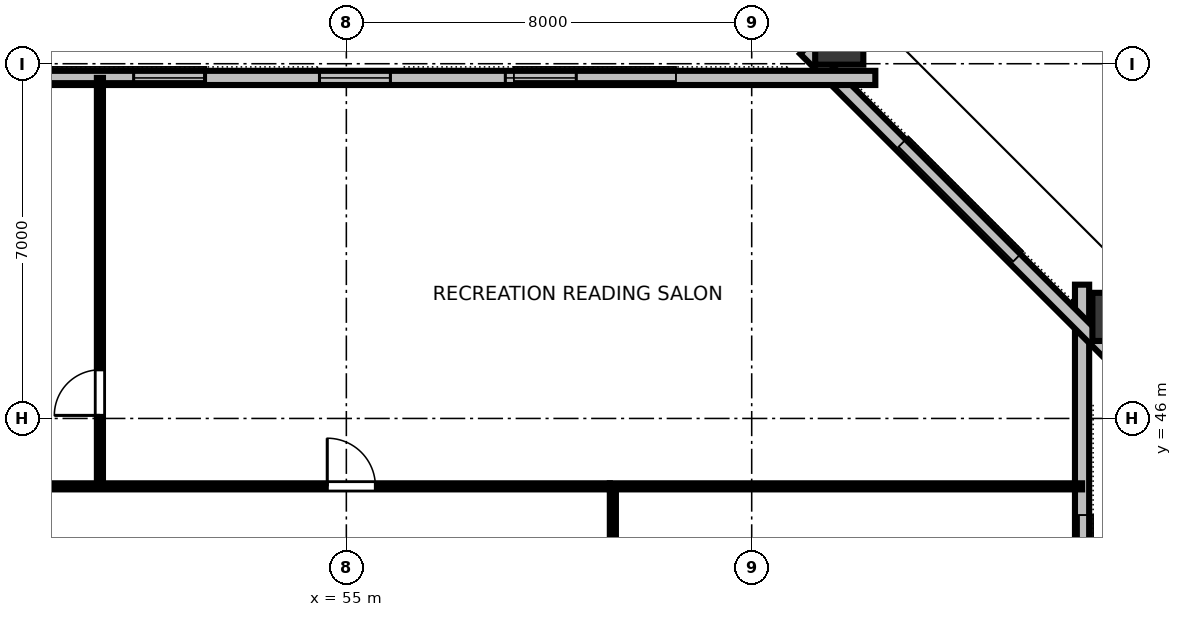
"""IFC4 building model, lengths in metres.
Left out: names, types, materials, properties, quantities, classifications, styles, units other than length and angle.
Written with IfcOpenShell. Run it as: python <this file> out.ifc"""

import sys

from ifc_helpers import new_model, si_unit, direction, frame, frame_2d, origin, origin_2d, place, context, subcontext, project, spatial, rectangle, hollow_rectangle, extrude, element, fill, save


model = new_model("IFC4")
c1 = context("Model", 3, precision=1e-05, world=origin(), true_north=direction((0.0, 1.0)))
c2 = subcontext(c1, "Body", "Model", "MODEL_VIEW")
j1 = project(units=[si_unit("LENGTHUNIT", "METRE"), si_unit("PLANEANGLEUNIT", "RADIAN")], contexts=[c1])
p1 = place(None, origin())
s1 = spatial("IfcSite", under=j1, at=p1, CompositionType="ELEMENT")
p2 = place(p1, origin())
s2 = spatial("IfcBuilding", under=s1, at=p2, CompositionType="ELEMENT")
p3 = place(p2, frame((0.0, 0.0, 102.4)))
s3 = spatial("IfcBuildingStorey", under=s2, at=p3, CompositionType="ELEMENT", Elevation=102.4)
p4 = place(p3, frame((70.299, 48.004, 0.0), z_axis=(-0.187073570433, -0.199172160222, 0.961942789275), x_axis=(0.658567101109, 0.701158543536, 0.273250928932)))
e1 = element("IfcColumn", 1, at=p4, inside=s3, PredefinedType="COLUMN", context=c2, shape_type="SweptSolid", body=[
    extrude(hollow_rectangle(XDim=0.95, YDim=1.15, WallThickness=0.06, at=origin_2d()), origin(), (0.0, 0.0, 1.0), 3.491),
])
p5 = place(p3, frame((64.728, 53.556, 0.0), z_axis=(-0.227502922189, -0.158490675606, 0.960792967367), x_axis=(0.571617951621, -0.820519906757, 0.0)))
e2 = element("IfcColumn", 2, at=p5, inside=s3, PredefinedType="COLUMN", context=c2, shape_type="SweptSolid", body=[
    extrude(hollow_rectangle(XDim=0.95, YDim=1.15, WallThickness=0.06, at=origin_2d()), origin(), (0.0, 0.0, 1.0), 3.495),
])
p6 = place(p3, frame((69.52, 15.36, 0.0), z_axis=(0.0, 0.0, 1.0), x_axis=(0.0, 1.0, 0.0)))
e3 = element("IfcWall", 3, at=p6, inside=s3, PredefinedType="STANDARD", context=c2, shape_type="SweptSolid", body=[
    extrude(rectangle(XDim=33.28, YDim=0.28, at=frame_2d((16.64, 0.0))), origin(), (0.0, 0.0, 1.0), 2.662),
])
p7 = place(p6, frame((6.228, 0.0, 0.85)))
e4 = element("IfcOpeningElement", 4, at=p7, cuts=e3, PredefinedType="OPENING", context=c2, shape_type="SweptSolid", body=[
    extrude(rectangle(XDim=1.4, YDim=1.2, at=frame_2d((0.7, 0.6))), frame((0.0, 0.15, 0.0), z_axis=(0.0, -1.0, 0.0), x_axis=(1.0, 0.0, 0.0)), (0.0, 0.0, 1.0), 0.3),
])
p8 = place(p6, frame((10.113, 0.0, 0.85)))
e5 = element("IfcOpeningElement", 5, at=p8, cuts=e3, PredefinedType="OPENING", context=c2, shape_type="SweptSolid", body=[
    extrude(rectangle(XDim=1.4, YDim=1.2, at=frame_2d((0.7, 0.6))), frame((0.0, 0.15, 0.0), z_axis=(0.0, -1.0, 0.0), x_axis=(1.0, 0.0, 0.0)), (0.0, 0.0, 1.0), 0.3),
])
p9 = place(p6, frame((13.998, 0.0, 0.85)))
e6 = element("IfcOpeningElement", 6, at=p9, cuts=e3, PredefinedType="OPENING", context=c2, shape_type="SweptSolid", body=[
    extrude(rectangle(XDim=1.4, YDim=1.2, at=frame_2d((0.7, 0.6))), frame((0.0, 0.15, 0.0), z_axis=(0.0, -1.0, 0.0), x_axis=(1.0, 0.0, 0.0)), (0.0, 0.0, 1.0), 0.3),
])
p10 = place(p6, frame((17.883, 0.0, 0.85)))
e7 = element("IfcOpeningElement", 7, at=p10, cuts=e3, PredefinedType="OPENING", context=c2, shape_type="SweptSolid", body=[
    extrude(rectangle(XDim=1.4, YDim=1.2, at=frame_2d((0.7, 0.6))), frame((0.0, 0.15, 0.0), z_axis=(0.0, -1.0, 0.0), x_axis=(1.0, 0.0, 0.0)), (0.0, 0.0, 1.0), 0.3),
])
p11 = place(p6, frame((21.768, 0.0, 0.85)))
e8 = element("IfcOpeningElement", 8, at=p11, cuts=e3, PredefinedType="OPENING", context=c2, shape_type="SweptSolid", body=[
    extrude(rectangle(XDim=1.4, YDim=1.2, at=frame_2d((0.7, 0.6))), frame((0.0, 0.15, 0.0), z_axis=(0.0, -1.0, 0.0), x_axis=(1.0, 0.0, 0.0)), (0.0, 0.0, 1.0), 0.3),
])
p12 = place(p6, frame((25.653, 0.0, 0.85)))
e9 = element("IfcOpeningElement", 9, at=p12, cuts=e3, PredefinedType="OPENING", context=c2, shape_type="SweptSolid", body=[
    extrude(rectangle(XDim=1.4, YDim=1.2, at=frame_2d((0.7, 0.6))), frame((0.0, 0.15, 0.0), z_axis=(0.0, -1.0, 0.0), x_axis=(1.0, 0.0, 0.0)), (0.0, 0.0, 1.0), 0.3),
])
p13 = place(p3, frame((70.094, 47.254, 0.0), z_axis=(0.0, 0.0, 1.0), x_axis=(-0.707106781187, 0.707106781187, 0.0)))
e10 = element("IfcWall", 10, at=p13, inside=s3, PredefinedType="STANDARD", context=c2, shape_type="SweptSolid", body=[
    extrude(rectangle(XDim=8.541, YDim=0.28, at=frame_2d((4.271, 0.0))), origin(), (0.0, 0.0, 1.0), 2.662),
])
p14 = place(p3, frame((65.44, 52.72, 0.0), z_axis=(0.0, 0.0, 1.0), x_axis=(-1.0, 0.0, 0.0)))
e11 = element("IfcWall", 11, at=p14, inside=s3, PredefinedType="STANDARD", context=c2, shape_type="SweptSolid", body=[
    extrude(rectangle(XDim=38.88, YDim=0.28, at=frame_2d((19.44, 0.0))), origin(), (0.0, 0.0, 1.0), 2.662),
])
p15 = place(p14, frame((5.902, 0.0, 0.85)))
e12 = element("IfcOpeningElement", 12, at=p15, cuts=e11, PredefinedType="OPENING", context=c2, shape_type="SweptSolid", body=[
    extrude(rectangle(XDim=1.4, YDim=1.2, at=frame_2d((0.7, 0.6))), frame((0.0, 0.15, 0.0), z_axis=(0.0, -1.0, 0.0), x_axis=(1.0, 0.0, 0.0)), (0.0, 0.0, 1.0), 0.3),
])
p16 = place(p14, frame((9.57, 0.0, 0.85)))
e13 = element("IfcOpeningElement", 13, at=p16, cuts=e11, PredefinedType="OPENING", context=c2, shape_type="SweptSolid", body=[
    extrude(rectangle(XDim=1.4, YDim=1.2, at=frame_2d((0.7, 0.6))), frame((0.0, 0.15, 0.0), z_axis=(0.0, -1.0, 0.0), x_axis=(1.0, 0.0, 0.0)), (0.0, 0.0, 1.0), 0.3),
])
p17 = place(p14, frame((13.238, 0.0, 0.85)))
e14 = element("IfcOpeningElement", 14, at=p17, cuts=e11, PredefinedType="OPENING", context=c2, shape_type="SweptSolid", body=[
    extrude(rectangle(XDim=1.4, YDim=1.2, at=frame_2d((0.7, 0.6))), frame((0.0, 0.15, 0.0), z_axis=(0.0, -1.0, 0.0), x_axis=(1.0, 0.0, 0.0)), (0.0, 0.0, 1.0), 0.3),
])
p18 = place(p14, frame((16.906, 0.0, 0.85)))
e15 = element("IfcOpeningElement", 15, at=p18, cuts=e11, PredefinedType="OPENING", context=c2, shape_type="SweptSolid", body=[
    extrude(rectangle(XDim=1.4, YDim=1.2, at=frame_2d((0.7, 0.6))), frame((0.0, 0.15, 0.0), z_axis=(0.0, -1.0, 0.0), x_axis=(1.0, 0.0, 0.0)), (0.0, 0.0, 1.0), 0.3),
])
p19 = place(p14, frame((20.574, 0.0, 0.85)))
e16 = element("IfcOpeningElement", 16, at=p19, cuts=e11, PredefinedType="OPENING", context=c2, shape_type="SweptSolid", body=[
    extrude(rectangle(XDim=1.4, YDim=1.2, at=frame_2d((0.7, 0.6))), frame((0.0, 0.15, 0.0), z_axis=(0.0, -1.0, 0.0), x_axis=(1.0, 0.0, 0.0)), (0.0, 0.0, 1.0), 0.3),
])
p20 = place(p14, frame((24.242, 0.0, 0.85)))
e17 = element("IfcOpeningElement", 17, at=p20, cuts=e11, PredefinedType="OPENING", context=c2, shape_type="SweptSolid", body=[
    extrude(rectangle(XDim=1.4, YDim=1.2, at=frame_2d((0.7, 0.6))), frame((0.0, 0.15, 0.0), z_axis=(0.0, -1.0, 0.0), x_axis=(1.0, 0.0, 0.0)), (0.0, 0.0, 1.0), 0.3),
])
p21 = place(p14, frame((27.91, 0.0, 0.85)))
e18 = element("IfcOpeningElement", 18, at=p21, cuts=e11, PredefinedType="OPENING", context=c2, shape_type="SweptSolid", body=[
    extrude(rectangle(XDim=1.4, YDim=1.2, at=frame_2d((0.7, 0.6))), frame((0.0, 0.15, 0.0), z_axis=(0.0, -1.0, 0.0), x_axis=(1.0, 0.0, 0.0)), (0.0, 0.0, 1.0), 0.3),
])
p22 = place(p14, frame((31.578, 0.0, 0.85)))
e19 = element("IfcOpeningElement", 19, at=p22, cuts=e11, PredefinedType="OPENING", context=c2, shape_type="SweptSolid", body=[
    extrude(rectangle(XDim=1.4, YDim=1.2, at=frame_2d((0.7, 0.6))), frame((0.0, 0.15, 0.0), z_axis=(0.0, -1.0, 0.0), x_axis=(1.0, 0.0, 0.0)), (0.0, 0.0, 1.0), 0.3),
])
p23 = place(p3, frame((50.137, 44.66, 0.0), z_axis=(0.0, 0.0, 1.0), x_axis=(0.0, 1.0, 0.0)))
e20 = element("IfcWall", 20, at=p23, inside=s3, PredefinedType="PARTITIONING", context=c2, shape_type="SweptSolid", body=[
    extrude(rectangle(XDim=8.06, YDim=0.12, at=frame_2d((4.03, 0.0))), origin(), (0.0, 0.0, 1.0), 2.64),
])
p24 = place(p23, frame((1.4, 0.0, 0.0)))
e21 = element("IfcOpeningElement", 21, at=p24, cuts=e20, PredefinedType="OPENING", context=c2, shape_type="SweptSolid", body=[
    extrude(rectangle(XDim=0.9, YDim=2.15, at=frame_2d((0.45, 1.075))), frame((0.0, 0.07, 0.0), z_axis=(0.0, -1.0, 0.0), x_axis=(1.0, 0.0, 0.0)), (0.0, 0.0, 1.0), 0.14),
])
p25 = place(p3, frame((31.8, 44.66, 0.0), z_axis=(0.0, 0.0, 1.0), x_axis=(1.0, 0.0, 0.0)))
e22 = element("IfcWall", 22, at=p25, inside=s3, PredefinedType="PARTITIONING", context=c2, shape_type="SweptSolid", body=[
    extrude(rectangle(XDim=28.4, YDim=0.12, at=frame_2d((14.2, 0.0))), origin(), (0.0, 0.0, 1.0), 2.64),
])
p26 = place(p25, frame((3.452, 0.0, 0.0)))
e23 = element("IfcOpeningElement", 23, at=p26, cuts=e22, PredefinedType="OPENING", context=c2, shape_type="SweptSolid", body=[
    extrude(rectangle(XDim=0.95, YDim=2.15, at=frame_2d((0.475, 1.075))), frame((0.0, 0.07, 0.0), z_axis=(0.0, -1.0, 0.0), x_axis=(1.0, 0.0, 0.0)), (0.0, 0.0, 1.0), 0.14),
])
p27 = place(p25, frame((12.551, 0.0, 0.0)))
e24 = element("IfcOpeningElement", 24, at=p27, cuts=e22, PredefinedType="OPENING", context=c2, shape_type="SweptSolid", body=[
    extrude(rectangle(XDim=0.95, YDim=2.15, at=frame_2d((0.475, 1.075))), frame((0.0, 0.07, 0.0), z_axis=(0.0, -1.0, 0.0), x_axis=(1.0, 0.0, 0.0)), (0.0, 0.0, 1.0), 0.14),
])
p28 = place(p25, frame((22.823, 0.0, 0.0)))
e25 = element("IfcOpeningElement", 25, at=p28, cuts=e22, PredefinedType="OPENING", context=c2, shape_type="SweptSolid", body=[
    extrude(rectangle(XDim=0.95, YDim=2.15, at=frame_2d((0.475, 1.075))), frame((0.0, 0.07, 0.0), z_axis=(0.0, -1.0, 0.0), x_axis=(1.0, 0.0, 0.0)), (0.0, 0.0, 1.0), 0.14),
])
p29 = place(p3, frame((60.26, 33.02, 0.0), z_axis=(0.0, 0.0, 1.0), x_axis=(0.0, 1.0, 0.0)))
e26 = element("IfcWall", 26, at=p29, inside=s3, PredefinedType="PARTITIONING", context=c2, shape_type="SweptSolid", body=[
    extrude(rectangle(XDim=11.58, YDim=0.12, at=frame_2d((5.79, 0.0))), origin(), (0.0, 0.0, 1.0), 2.64),
])
p30 = place(p29, frame((5.215, 0.0, 0.0)))
e27 = element("IfcOpeningElement", 27, at=p30, cuts=e26, PredefinedType="OPENING", context=c2, shape_type="SweptSolid", body=[
    extrude(rectangle(XDim=0.95, YDim=2.15, at=frame_2d((0.475, 1.075))), frame((0.0, 0.07, 0.0), z_axis=(0.0, -1.0, 0.0), x_axis=(1.0, 0.0, 0.0)), (0.0, 0.0, 1.0), 0.14),
])
p31 = place(p3, frame((60.2, 44.66, 0.0), z_axis=(0.0, 0.0, 1.0), x_axis=(1.0, 0.0, 0.0)))
e28 = element("IfcWall", 28, at=p31, inside=s3, PredefinedType="PARTITIONING", context=c2, shape_type="SweptSolid", body=[
    extrude(rectangle(XDim=9.32, YDim=0.12, at=frame_2d((4.66, 0.0))), origin(), (0.0, 0.0, 1.0), 2.64),
])
p32 = place(p15, origin())
e29 = element("IfcWindow", 29, at=p32, inside=s3, PartitioningType="SINGLE_PANEL", PredefinedType="WINDOW", context=c2, shape_type="SweptSolid", body=[
    extrude(rectangle(XDim=1.4, YDim=1.2, at=frame_2d((0.7, 0.6))), frame((0.0, 0.03, 0.0), z_axis=(0.0, -1.0, 0.0), x_axis=(1.0, 0.0, 0.0)), (0.0, 0.0, 1.0), 0.06),
])
fill(e12, e29)
p33 = place(p16, origin())
e30 = element("IfcWindow", 30, at=p33, inside=s3, PartitioningType="SINGLE_PANEL", PredefinedType="WINDOW", context=c2, shape_type="SweptSolid", body=[
    extrude(rectangle(XDim=1.4, YDim=1.2, at=frame_2d((0.7, 0.6))), frame((0.0, 0.03, 0.0), z_axis=(0.0, -1.0, 0.0), x_axis=(1.0, 0.0, 0.0)), (0.0, 0.0, 1.0), 0.06),
])
fill(e13, e30)
p34 = place(p17, origin())
e31 = element("IfcWindow", 31, at=p34, inside=s3, PartitioningType="SINGLE_PANEL", PredefinedType="WINDOW", context=c2, shape_type="SweptSolid", body=[
    extrude(rectangle(XDim=1.4, YDim=1.2, at=frame_2d((0.7, 0.6))), frame((0.0, 0.03, 0.0), z_axis=(0.0, -1.0, 0.0), x_axis=(1.0, 0.0, 0.0)), (0.0, 0.0, 1.0), 0.06),
])
fill(e14, e31)
p35 = place(p24, origin())
e32 = element("IfcDoor", 32, at=p35, inside=s3, OperationType="SINGLE_SWING_LEFT", PredefinedType="DOOR", context=c2, shape_type="SweptSolid", body=[
    extrude(rectangle(XDim=0.9, YDim=2.15, at=frame_2d((0.45, 1.075))), frame((0.0, 0.025, 0.0), z_axis=(0.0, -1.0, 0.0), x_axis=(1.0, 0.0, 0.0)), (0.0, 0.0, 1.0), 0.05),
])
fill(e21, e32)
p36 = place(p28, origin())
e33 = element("IfcDoor", 33, at=p36, inside=s3, OperationType="SINGLE_SWING_LEFT", PredefinedType="DOOR", context=c2, shape_type="SweptSolid", body=[
    extrude(rectangle(XDim=0.95, YDim=2.15, at=frame_2d((0.475, 1.075))), frame((0.0, 0.025, 0.0), z_axis=(0.0, -1.0, 0.0), x_axis=(1.0, 0.0, 0.0)), (0.0, 0.0, 1.0), 0.05),
])
fill(e25, e33)
save(model, sys.argv[1])
